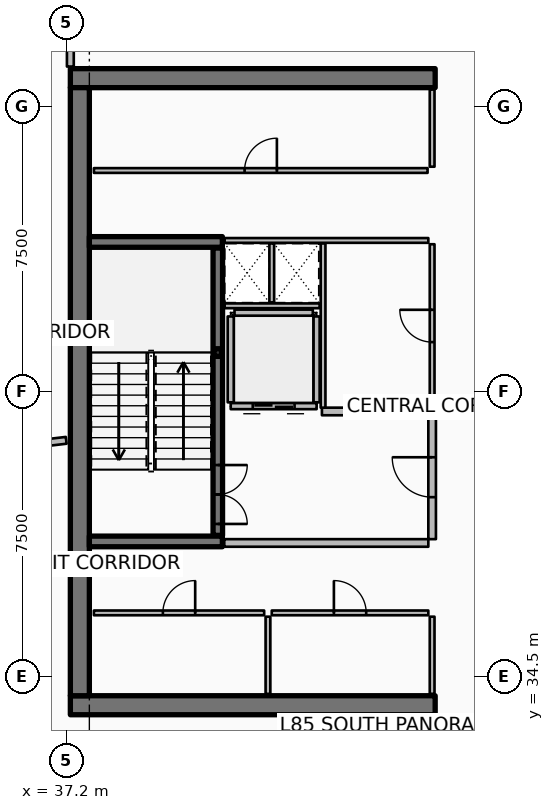
"""IFC4 building model, lengths in metres.
Left out: names, types, materials, properties, quantities, classifications, styles, units other than length and angle.
Written with IfcOpenShell. Run it as: python <this file> out.ifc"""

import sys

from ifc_helpers import new_model, si_unit, direction, frame, frame_2d, origin, origin_2d, place, context, subcontext, project, spatial, rectangle, hollow_rectangle, extrude, element, fill, save


model = new_model("IFC4")
c1 = context("Model", 3, precision=1e-05, world=origin(), true_north=direction((0.0, 1.0)))
c2 = subcontext(c1, "Body", "Model", "MODEL_VIEW")
j1 = project(units=[si_unit("LENGTHUNIT", "METRE"), si_unit("PLANEANGLEUNIT", "RADIAN")], contexts=[c1])
p1 = place(None, origin())
s1 = spatial("IfcSite", under=j1, at=p1, CompositionType="ELEMENT")
p2 = place(p1, origin())
s2 = spatial("IfcBuilding", under=s1, at=p2, CompositionType="ELEMENT")
p3 = place(p2, frame((0.0, 0.0, 338.9)))
s3 = spatial("IfcBuildingStorey", under=s2, at=p3, CompositionType="ELEMENT", Elevation=338.9)
for number, where, z_axis, x_axis in (
    (1, (37.3, 33.75, 0.0), (0.0, 0.0, 1.0), (1.0, 0.0, 0.0)),
    (2, (37.3, 50.25, 0.0), (0.0, 0.0, 1.0), (1.0, 0.0, 0.0)),
):
    element("IfcWall", number, at=place(p3, frame(where, z_axis=z_axis, x_axis=x_axis)), inside=s3, PredefinedType="SHEAR", context=c2, shape_type="SweptSolid", body=[
        extrude(rectangle(XDim=9.6, YDim=0.5, at=frame_2d((4.8, 0.0))), origin(), (0.0, 0.0, 1.0), 4.2),
    ])
p4 = place(p3, frame((37.55, 34.0, 0.0), z_axis=(0.0, 0.0, 1.0), x_axis=(0.0, 1.0, 0.0)))
e3 = element("IfcWall", 3, at=p4, inside=s3, PredefinedType="SHEAR", context=c2, shape_type="SweptSolid", body=[
    extrude(rectangle(XDim=16.0, YDim=0.5, at=frame_2d((8.0, 0.0))), origin(), (0.0, 0.0, 1.0), 4.2),
])
for number, where, z_axis, x_axis in (
    (4, (37.8, 38.06, 0.0), (0.0, 0.0, 1.0), (1.0, 0.0, 0.0)),
    (5, (37.8, 45.94, 0.0), (0.0, 0.0, 1.0), (1.0, 0.0, 0.0)),
):
    element("IfcWall", number, at=place(p3, frame(where, z_axis=z_axis, x_axis=x_axis)), inside=s3, PredefinedType="SHEAR", context=c2, shape_type="SweptSolid", body=[
        extrude(rectangle(XDim=3.5, YDim=0.28, at=frame_2d((1.75, 0.0))), origin(), (0.0, 0.0, 1.0), 4.2),
    ])
p5 = place(p3, frame((41.18, 43.03, 0.0), z_axis=(0.0, 0.0, 1.0), x_axis=(1.0, 0.0, 0.0)))
e6 = element("IfcColumn", 6, at=p5, inside=s3, PredefinedType="COLUMN", context=c2, shape_type="SweptSolid", body=[
    extrude(hollow_rectangle(XDim=0.2, YDim=0.2, WallThickness=0.01, InnerFilletRadius=0.01, OuterFilletRadius=0.02, at=origin_2d()), origin(), (0.0, 0.0, 1.0), 1.895),
])
p6 = place(p3, frame((41.18, 38.22, 0.0), z_axis=(0.0, 0.0, 1.0), x_axis=(0.0, 1.0, 0.0)))
e7 = element("IfcWall", 7, at=p6, inside=s3, PredefinedType="SOLIDWALL", context=c2, shape_type="SweptSolid", body=[
    extrude(rectangle(XDim=7.56, YDim=0.25, at=frame_2d((3.78, 0.0))), origin(), (0.0, 0.0, 1.0), 3.8),
])
p7 = place(p6, frame((0.3, 0.0, 0.0)))
e8 = element("IfcOpeningElement", 8, at=p7, cuts=e7, PredefinedType="OPENING", context=c2, shape_type="SweptSolid", body=[
    extrude(rectangle(XDim=1.55, YDim=2.15, at=frame_2d((0.775, 1.075))), frame((0.0, 0.135, 0.0), z_axis=(0.0, -1.0, 0.0), x_axis=(1.0, 0.0, 0.0)), (0.0, 0.0, 1.0), 0.27),
])
p8 = place(p3, frame((43.78, 41.62, 0.0), z_axis=(0.0, 0.0, 1.0), x_axis=(-1.0, 0.0, 0.0)))
e9 = element("IfcWall", 9, at=p8, inside=s3, PredefinedType="PARTITIONING", context=c2, shape_type="SweptSolid", body=[
    extrude(rectangle(XDim=2.26, YDim=0.16, at=frame_2d((1.13, 0.0))), origin(), (0.0, 0.0, 1.0), 3.8),
])
p9 = place(p8, frame((0.58, 0.0, 0.0)))
e10 = element("IfcOpeningElement", 10, at=p9, cuts=e9, PredefinedType="OPENING", context=c2, shape_type="SweptSolid", body=[
    extrude(rectangle(XDim=1.1, YDim=2.1, at=frame_2d((0.55, 1.05))), frame((0.0, 0.09, 0.0), z_axis=(0.0, -1.0, 0.0), x_axis=(1.0, 0.0, 0.0)), (0.0, 0.0, 1.0), 0.18),
])
for number, where, z_axis, x_axis in (
    (11, (43.78, 41.72, 0.0), (0.0, 0.0, 1.0), (0.0, 1.0, 0.0)),
    (12, (41.52, 41.72, 0.0), (0.0, 0.0, 1.0), (0.0, 1.0, 0.0)),
):
    element("IfcWall", number, at=place(p3, frame(where, z_axis=z_axis, x_axis=x_axis)), inside=s3, PredefinedType="PARTITIONING", context=c2, shape_type="SweptSolid", body=[
        extrude(rectangle(XDim=2.26, YDim=0.16, at=frame_2d((1.13, 0.0))), origin(), (0.0, 0.0, 1.0), 3.8),
    ])
p10 = place(p3, frame((41.62, 44.08, 0.0), z_axis=(0.0, 0.0, 1.0), x_axis=(1.0, 0.0, 0.0)))
e13 = element("IfcWall", 13, at=p10, inside=s3, PredefinedType="PARTITIONING", context=c2, shape_type="SweptSolid", body=[
    extrude(rectangle(XDim=2.06, YDim=0.16, at=frame_2d((1.03, 0.0))), origin(), (0.0, 0.0, 1.0), 3.8),
])
for number, where, z_axis, x_axis in (
    (14, (46.82, 34.05, 0.0), (0.0, 0.0, 1.0), (0.0, 1.0, 0.0)),
    (15, (42.5, 34.05, 0.0), (0.0, 0.0, 1.0), (0.0, 1.0, 0.0)),
):
    element("IfcWall", number, at=place(p3, frame(where, z_axis=z_axis, x_axis=x_axis)), inside=s3, PredefinedType="PARTITIONING", context=c2, shape_type="SweptSolid", body=[
        extrude(rectangle(XDim=2.03, YDim=0.125, at=frame_2d((1.015, 0.0))), origin(), (0.0, 0.0, 1.0), 3.24),
    ])
p11 = place(p3, frame((37.92, 36.18, 0.0), z_axis=(0.0, 0.0, 1.0), x_axis=(1.0, 0.0, 0.0)))
e16 = element("IfcWall", 16, at=p11, inside=s3, PredefinedType="PARTITIONING", context=c2, shape_type="SweptSolid", body=[
    extrude(rectangle(XDim=4.48, YDim=0.125, at=frame_2d((2.24, 0.0))), origin(), (0.0, 0.0, 1.0), 3.24),
])
p12 = place(p11, frame((1.815, 0.0, 0.0)))
e17 = element("IfcOpeningElement", 17, at=p12, cuts=e16, PredefinedType="OPENING", context=c2, shape_type="SweptSolid", body=[
    extrude(rectangle(XDim=0.85, YDim=2.06, at=frame_2d((0.425, 1.03))), frame((0.0, 0.073, 0.0), z_axis=(0.0, -1.0, 0.0), x_axis=(1.0, 0.0, 0.0)), (0.0, 0.0, 1.0), 0.145),
])
p13 = place(p3, frame((42.6, 36.18, 0.0), z_axis=(0.0, 0.0, 1.0), x_axis=(1.0, 0.0, 0.0)))
e18 = element("IfcWall", 18, at=p13, inside=s3, PredefinedType="PARTITIONING", context=c2, shape_type="SweptSolid", body=[
    extrude(rectangle(XDim=4.12, YDim=0.125, at=frame_2d((2.06, 0.0))), origin(), (0.0, 0.0, 1.0), 3.24),
])
p14 = place(p13, frame((1.635, 0.0, 0.0)))
e19 = element("IfcOpeningElement", 19, at=p14, cuts=e18, PredefinedType="OPENING", context=c2, shape_type="SweptSolid", body=[
    extrude(rectangle(XDim=0.85, YDim=2.06, at=frame_2d((0.425, 1.03))), frame((0.0, 0.073, 0.0), z_axis=(0.0, -1.0, 0.0), x_axis=(1.0, 0.0, 0.0)), (0.0, 0.0, 1.0), 0.145),
])
p15 = place(p3, frame((46.82, 47.92, 0.0), z_axis=(0.0, 0.0, 1.0), x_axis=(0.0, 1.0, 0.0)))
e20 = element("IfcWall", 20, at=p15, inside=s3, PredefinedType="PARTITIONING", context=c2, shape_type="SweptSolid", body=[
    extrude(rectangle(XDim=2.03, YDim=0.125, at=frame_2d((1.015, 0.0))), origin(), (0.0, 0.0, 1.0), 3.24),
])
p16 = place(p3, frame((37.92, 47.82, 0.0), z_axis=(0.0, 0.0, 1.0), x_axis=(1.0, 0.0, 0.0)))
e21 = element("IfcWall", 21, at=p16, inside=s3, PredefinedType="PARTITIONING", context=c2, shape_type="SweptSolid", body=[
    extrude(rectangle(XDim=8.78, YDim=0.125, at=frame_2d((4.39, 0.0))), origin(), (0.0, 0.0, 1.0), 3.24),
])
p17 = place(p16, frame((3.965, 0.0, 0.0)))
e22 = element("IfcOpeningElement", 22, at=p17, cuts=e21, PredefinedType="OPENING", context=c2, shape_type="SweptSolid", body=[
    extrude(rectangle(XDim=0.85, YDim=2.06, at=frame_2d((0.425, 1.03))), frame((0.0, 0.073, 0.0), z_axis=(0.0, -1.0, 0.0), x_axis=(1.0, 0.0, 0.0)), (0.0, 0.0, 1.0), 0.145),
])
p18 = place(p3, frame((41.35, 38.02, 0.0), z_axis=(0.0, 0.0, 1.0), x_axis=(1.0, 0.0, 0.0)))
e23 = element("IfcWall", 23, at=p18, inside=s3, PredefinedType="PARTITIONING", context=c2, shape_type="SweptSolid", body=[
    extrude(rectangle(XDim=5.37, YDim=0.2, at=frame_2d((2.685, 0.0))), origin(), (0.0, 0.0, 1.0), 3.8),
])
p19 = place(p3, frame((43.92, 41.48, 0.0), z_axis=(0.0, 0.0, 1.0), x_axis=(1.0, 0.0, 0.0)))
e24 = element("IfcWall", 24, at=p19, inside=s3, PredefinedType="PARTITIONING", context=c2, shape_type="SweptSolid", body=[
    extrude(rectangle(XDim=2.8, YDim=0.2, at=frame_2d((1.4, 0.0))), origin(), (0.0, 0.0, 1.0), 3.8),
])
p20 = place(p3, frame((46.82, 38.12, 0.0), z_axis=(0.0, 0.0, 1.0), x_axis=(0.0, 1.0, 0.0)))
e25 = element("IfcWall", 25, at=p20, inside=s3, PredefinedType="PARTITIONING", context=c2, shape_type="SweptSolid", body=[
    extrude(rectangle(XDim=3.26, YDim=0.2, at=frame_2d((1.63, 0.0))), origin(), (0.0, 0.0, 1.0), 3.8),
])
p21 = place(p20, frame((1.105, 0.0, 0.0)))
e26 = element("IfcOpeningElement", 26, at=p21, cuts=e25, PredefinedType="OPENING", context=c2, shape_type="SweptSolid", body=[
    extrude(rectangle(XDim=1.05, YDim=2.1, at=frame_2d((0.525, 1.05))), frame((0.0, 0.11, 0.0), z_axis=(0.0, -1.0, 0.0), x_axis=(1.0, 0.0, 0.0)), (0.0, 0.0, 1.0), 0.22),
])
p22 = place(p3, frame((41.36, 45.98, 0.0), z_axis=(0.0, 0.0, 1.0), x_axis=(1.0, 0.0, 0.0)))
e27 = element("IfcWall", 27, at=p22, inside=s3, PredefinedType="PARTITIONING", context=c2, shape_type="SweptSolid", body=[
    extrude(rectangle(XDim=5.36, YDim=0.125, at=frame_2d((2.68, 0.0))), origin(), (0.0, 0.0, 1.0), 3.24),
])
p23 = place(p3, frame((41.36, 44.26, 0.0), z_axis=(0.0, 0.0, 1.0), x_axis=(1.0, 0.0, 0.0)))
e28 = element("IfcWall", 28, at=p23, inside=s3, PredefinedType="PARTITIONING", context=c2, shape_type="SweptSolid", body=[
    extrude(rectangle(XDim=2.5, YDim=0.125, at=frame_2d((1.25, 0.0))), origin(), (0.0, 0.0, 1.0), 3.24),
])
p24 = place(p3, frame((42.6, 44.35, 0.0), z_axis=(0.0, 0.0, 1.0), x_axis=(0.0, 1.0, 0.0)))
e29 = element("IfcWall", 29, at=p24, inside=s3, PredefinedType="PARTITIONING", context=c2, shape_type="SweptSolid", body=[
    extrude(rectangle(XDim=1.55, YDim=0.125, at=frame_2d((0.775, 0.0))), origin(), (0.0, 0.0, 1.0), 3.24),
])
p25 = place(p3, frame((43.95, 41.58, 0.0), z_axis=(0.0, 0.0, 1.0), x_axis=(0.0, 1.0, 0.0)))
e30 = element("IfcWall", 30, at=p25, inside=s3, PredefinedType="PARTITIONING", context=c2, shape_type="SweptSolid", body=[
    extrude(rectangle(XDim=4.32, YDim=0.125, at=frame_2d((2.16, 0.0))), origin(), (0.0, 0.0, 1.0), 3.24),
])
p26 = place(p3, frame((46.82, 41.58, 0.0), z_axis=(0.0, 0.0, 1.0), x_axis=(0.0, 1.0, 0.0)))
e31 = element("IfcWall", 31, at=p26, inside=s3, PredefinedType="PARTITIONING", context=c2, shape_type="SweptSolid", body=[
    extrude(rectangle(XDim=4.3, YDim=0.125, at=frame_2d((2.15, 0.0))), origin(), (0.0, 0.0, 1.0), 3.24),
])
p27 = place(p26, frame((1.725, 0.0, 0.0)))
e32 = element("IfcOpeningElement", 32, at=p27, cuts=e31, PredefinedType="OPENING", context=c2, shape_type="SweptSolid", body=[
    extrude(rectangle(XDim=0.85, YDim=2.06, at=frame_2d((0.425, 1.03))), frame((0.0, 0.073, 0.0), z_axis=(0.0, -1.0, 0.0), x_axis=(1.0, 0.0, 0.0)), (0.0, 0.0, 1.0), 0.145),
])
p28 = place(p3, frame((37.191, 40.721, 0.0), z_axis=(0.0, 0.0, 1.0), x_axis=(-0.993068548333, -0.117536625409, 0.0)))
e33 = element("IfcWall", 33, at=p28, inside=s3, PredefinedType="PARTITIONING", context=c2, shape_type="SweptSolid", body=[
    extrude(rectangle(XDim=14.951, YDim=0.18, at=frame_2d((7.476, 0.0))), origin(), (0.0, 0.0, 1.0), 3.24),
])
p29 = place(p3, frame((37.3, 52.18, 0.0), z_axis=(0.0, 0.0, 1.0), x_axis=(0.0, -1.0, 0.0)))
e34 = element("IfcWall", 34, at=p29, inside=s3, PredefinedType="PARTITIONING", context=c2, shape_type="SweptSolid", body=[
    extrude(rectangle(XDim=1.625, YDim=0.18, at=frame_2d((0.812, 0.0))), origin(), (0.0, 0.0, 1.0), 3.24),
])
p30 = place(p7, origin())
e35 = element("IfcDoor", 35, at=p30, inside=s3, OperationType="DOUBLE_DOOR_SINGLE_SWING", PredefinedType="DOOR", context=c2, shape_type="SweptSolid", body=[
    extrude(rectangle(XDim=1.55, YDim=2.15, at=frame_2d((0.775, 1.075))), frame((0.0, 0.025, 0.0), z_axis=(0.0, -1.0, 0.0), x_axis=(1.0, 0.0, 0.0)), (0.0, 0.0, 1.0), 0.05),
])
fill(e8, e35)
p31 = place(p9, origin())
e36 = element("IfcDoor", 36, at=p31, inside=s3, OperationType="DOUBLE_DOOR_SLIDING", PredefinedType="DOOR", context=c2, shape_type="SweptSolid", body=[
    extrude(rectangle(XDim=1.1, YDim=2.1, at=frame_2d((0.55, 1.05))), frame((0.0, 0.025, 0.0), z_axis=(0.0, -1.0, 0.0), x_axis=(1.0, 0.0, 0.0)), (0.0, 0.0, 1.0), 0.05),
])
fill(e10, e36)
p32 = place(p12, origin())
e37 = element("IfcDoor", 37, at=p32, inside=s3, OperationType="SINGLE_SWING_RIGHT", PredefinedType="DOOR", context=c2, shape_type="SweptSolid", body=[
    extrude(rectangle(XDim=0.85, YDim=2.06, at=frame_2d((0.425, 1.03))), frame((0.0, 0.025, 0.0), z_axis=(0.0, -1.0, 0.0), x_axis=(1.0, 0.0, 0.0)), (0.0, 0.0, 1.0), 0.05),
])
fill(e17, e37)
p33 = place(p14, origin())
e38 = element("IfcDoor", 38, at=p33, inside=s3, OperationType="SINGLE_SWING_LEFT", PredefinedType="DOOR", context=c2, shape_type="SweptSolid", body=[
    extrude(rectangle(XDim=0.85, YDim=2.06, at=frame_2d((0.425, 1.03))), frame((0.0, 0.025, 0.0), z_axis=(0.0, -1.0, 0.0), x_axis=(1.0, 0.0, 0.0)), (0.0, 0.0, 1.0), 0.05),
])
fill(e19, e38)
p34 = place(p17, origin())
e39 = element("IfcDoor", 39, at=p34, inside=s3, OperationType="SINGLE_SWING_RIGHT", PredefinedType="DOOR", context=c2, shape_type="SweptSolid", body=[
    extrude(rectangle(XDim=0.85, YDim=2.06, at=frame_2d((0.425, 1.03))), frame((0.0, 0.025, 0.0), z_axis=(0.0, -1.0, 0.0), x_axis=(1.0, 0.0, 0.0)), (0.0, 0.0, 1.0), 0.05),
])
fill(e22, e39)
p35 = place(p21, origin())
e40 = element("IfcDoor", 40, at=p35, inside=s3, OperationType="SINGLE_SWING_RIGHT", PredefinedType="DOOR", context=c2, shape_type="SweptSolid", body=[
    extrude(rectangle(XDim=1.05, YDim=2.1, at=frame_2d((0.525, 1.05))), frame((0.0, 0.025, 0.0), z_axis=(0.0, -1.0, 0.0), x_axis=(1.0, 0.0, 0.0)), (0.0, 0.0, 1.0), 0.05),
])
fill(e26, e40)
p36 = place(p27, origin())
e41 = element("IfcDoor", 41, at=p36, inside=s3, OperationType="SINGLE_SWING_RIGHT", PredefinedType="DOOR", context=c2, shape_type="SweptSolid", body=[
    extrude(rectangle(XDim=0.85, YDim=2.06, at=frame_2d((0.425, 1.03))), frame((0.0, 0.025, 0.0), z_axis=(0.0, -1.0, 0.0), x_axis=(1.0, 0.0, 0.0)), (0.0, 0.0, 1.0), 0.05),
])
fill(e32, e41)
save(model, sys.argv[1])
